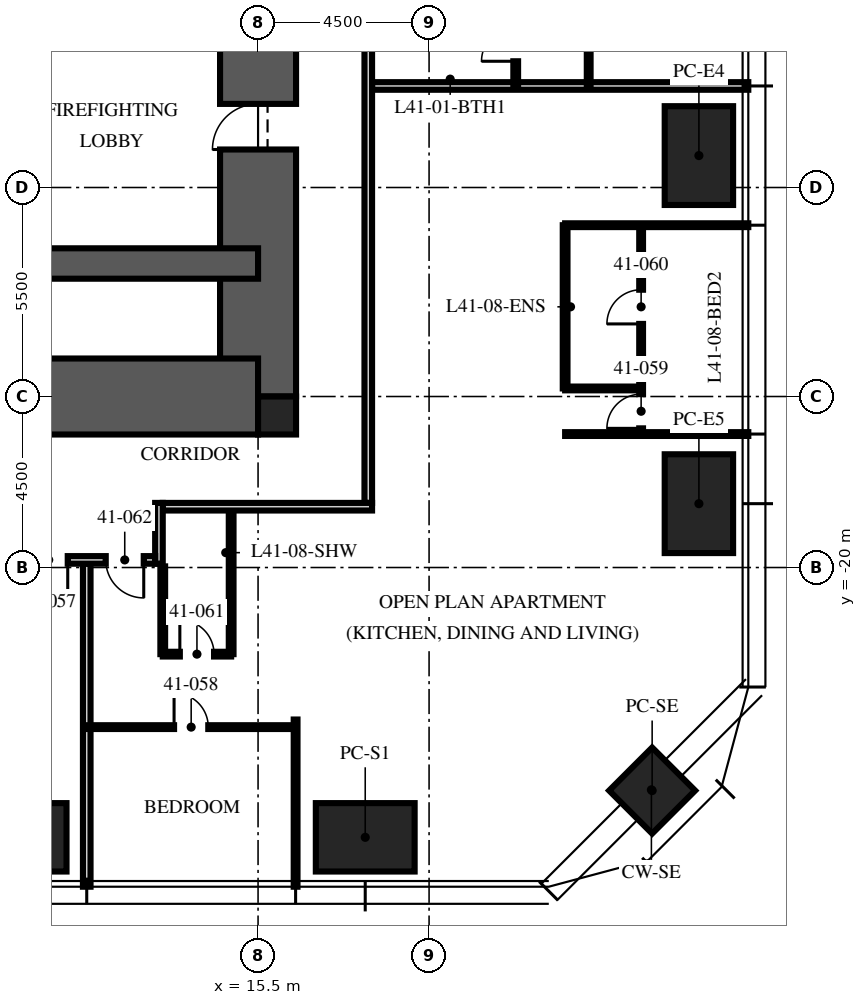
"""IFC4 building model, lengths in metres.
Left out: names, types, materials, properties, quantities, classifications, styles, units other than length and angle.
Written with IfcOpenShell. Run it as: python <this file> out.ifc"""

import sys

from ifc_helpers import new_model, si_unit, direction, frame, frame_2d, origin, origin_2d, place, context, subcontext, project, spatial, rectangle, extrude, element, fill, save


model = new_model("IFC4")
c1 = context("Model", 3, precision=1e-05, world=origin(), true_north=direction((0.0, 1.0)))
c2 = subcontext(c1, "Body", "Model", "MODEL_VIEW")
j1 = project(units=[si_unit("LENGTHUNIT", "METRE"), si_unit("PLANEANGLEUNIT", "RADIAN")], contexts=[c1])
p1 = place(None, origin())
s1 = spatial("IfcSite", under=j1, at=p1, CompositionType="ELEMENT")
p2 = place(p1, origin())
s2 = spatial("IfcBuilding", under=s1, at=p2, CompositionType="ELEMENT")
p3 = place(p2, frame((0.0, 0.0, 163.5)))
s3 = spatial("IfcBuildingStorey", under=s2, at=p3, CompositionType="ELEMENT", Elevation=163.5)
p4 = place(p3, frame((15.5, -15.5, -0.25), z_axis=(0.0, 0.0, 1.0), x_axis=(0.0, 1.0, 0.0)))
e1 = element("IfcWall", 1, at=p4, inside=s3, PredefinedType="SHEAR", context=c2, shape_type="SweptSolid", body=[
    extrude(rectangle(XDim=31.0, YDim=2.0, at=frame_2d((15.5, 0.0))), origin(), (0.0, 0.0, 1.0), 3.75),
])
p5 = place(p4, frame((6.5, 0.0, 0.25)))
e2 = element("IfcOpeningElement", 2, at=p5, cuts=e1, PredefinedType="OPENING", context=c2, shape_type="SweptSolid", body=[
    extrude(rectangle(XDim=1.2, YDim=2.1, at=frame_2d((0.6, 1.05))), frame((0.0, 1.01, 0.0), z_axis=(0.0, -1.0, 0.0), x_axis=(1.0, 0.0, 0.0)), (0.0, 0.0, 1.0), 2.02),
])
p6 = place(p4, frame((23.0, 0.0, 0.25)))
e3 = element("IfcOpeningElement", 3, at=p6, cuts=e1, PredefinedType="OPENING", context=c2, shape_type="SweptSolid", body=[
    extrude(rectangle(XDim=1.8, YDim=2.1, at=frame_2d((0.9, 1.05))), frame((0.0, 1.01, 0.0), z_axis=(0.0, -1.0, 0.0), x_axis=(1.0, 0.0, 0.0)), (0.0, 0.0, 1.0), 2.02),
])
p7 = place(p3, frame((-15.5, -15.5, -0.25), z_axis=(0.0, 0.0, 1.0), x_axis=(1.0, 0.0, 0.0)))
e4 = element("IfcWall", 4, at=p7, inside=s3, PredefinedType="SHEAR", context=c2, shape_type="SweptSolid", body=[
    extrude(rectangle(XDim=31.0, YDim=2.0, at=frame_2d((15.5, 0.0))), origin(), (0.0, 0.0, 1.0), 3.75),
])
p8 = place(p7, frame((10.4, 0.0, 0.25)))
e5 = element("IfcOpeningElement", 5, at=p8, cuts=e4, PredefinedType="OPENING", context=c2, shape_type="SweptSolid", body=[
    extrude(rectangle(XDim=1.1, YDim=2.1, at=frame_2d((0.55, 1.05))), frame((0.0, 1.01, 0.0), z_axis=(0.0, -1.0, 0.0), x_axis=(1.0, 0.0, 0.0)), (0.0, 0.0, 1.0), 2.02),
])
p9 = place(p7, frame((13.5, 0.0, 0.25)))
e6 = element("IfcOpeningElement", 6, at=p9, cuts=e4, PredefinedType="OPENING", context=c2, shape_type="SweptSolid", body=[
    extrude(rectangle(XDim=1.1, YDim=2.1, at=frame_2d((0.55, 1.05))), frame((0.0, 1.01, 0.0), z_axis=(0.0, -1.0, 0.0), x_axis=(1.0, 0.0, 0.0)), (0.0, 0.0, 1.0), 2.02),
])
p10 = place(p7, frame((16.6, 0.0, 0.25)))
e7 = element("IfcOpeningElement", 7, at=p10, cuts=e4, PredefinedType="OPENING", context=c2, shape_type="SweptSolid", body=[
    extrude(rectangle(XDim=1.1, YDim=2.1, at=frame_2d((0.55, 1.05))), frame((0.0, 1.01, 0.0), z_axis=(0.0, -1.0, 0.0), x_axis=(1.0, 0.0, 0.0)), (0.0, 0.0, 1.0), 2.02),
])
p11 = place(p3, frame((-15.5, -12.0, -0.25), z_axis=(0.0, 0.0, 1.0), x_axis=(1.0, 0.0, 0.0)))
e8 = element("IfcWall", 8, at=p11, inside=s3, PredefinedType="SHEAR", context=c2, shape_type="SweptSolid", body=[
    extrude(rectangle(XDim=31.0, YDim=0.8, at=frame_2d((15.5, 0.0))), origin(), (0.0, 0.0, 1.0), 3.75),
])
p12 = place(p3, frame((16.0, -16.0, -0.25), z_axis=(0.0, 0.0, 1.0), x_axis=(1.0, 0.0, 0.0)))
e9 = element("IfcColumn", 9, at=p12, inside=s3, PredefinedType="COLUMN", context=c2, shape_type="SweptSolid", body=[
    extrude(rectangle(XDim=1.0, YDim=1.0, at=origin_2d()), origin(), (0.0, 0.0, 1.0), 3.75),
])
for number, where, z_axis, x_axis in (
    (10, (27.1, -9.16, 0.0), (0.0, 0.0, 1.0), (0.0, 1.0, 0.0)),
    (11, (27.1, -18.32, 0.0), (0.0, 0.0, 1.0), (0.0, 1.0, 0.0)),
    (12, (18.32, -27.1, 0.0), (0.0, 0.0, 1.0), (1.0, 0.0, 0.0)),
    (13, (9.16, -27.1, 0.0), (0.0, 0.0, 1.0), (1.0, 0.0, 0.0)),
):
    element("IfcColumn", number, at=place(p3, frame(where, z_axis=z_axis, x_axis=x_axis)), inside=s3, PredefinedType="COLUMN", context=c2, shape_type="SweptSolid", body=[
        extrude(rectangle(XDim=2.6, YDim=1.8, at=origin_2d()), origin(), (0.0, 0.0, 1.0), 3.75),
    ])
p13 = place(p3, frame((25.87, -25.87, 0.0), z_axis=(0.0, 0.0, 1.0), x_axis=(0.707106781187, 0.707106781187, 0.0)))
e14 = element("IfcColumn", 14, at=p13, inside=s3, PredefinedType="COLUMN", context=c2, shape_type="SweptSolid", body=[
    extrude(rectangle(XDim=1.6, YDim=1.6, at=origin_2d()), origin(), (0.0, 0.0, 1.0), 3.75),
])
p14 = place(p3, frame((18.5, -7.328, 0.0), z_axis=(0.0, 0.0, 1.0), x_axis=(1.0, 0.0, 0.0)))
e15 = element("IfcWall", 15, at=p14, inside=s3, PredefinedType="PARTITIONING", context=c2, shape_type="SweptSolid", body=[
    extrude(rectangle(XDim=9.9, YDim=0.2, at=frame_2d((4.95, 0.0))), origin(), (0.0, 0.0, 1.0), 2.81),
])
p15 = place(p3, frame((10.992, -19.9, 0.0), z_axis=(0.0, 0.0, 1.0), x_axis=(0.0, -1.0, 0.0)))
e16 = element("IfcWall", 16, at=p15, inside=s3, PredefinedType="PARTITIONING", context=c2, shape_type="SweptSolid", body=[
    extrude(rectangle(XDim=8.5, YDim=0.2, at=frame_2d((4.25, 0.0))), origin(), (0.0, 0.0, 1.0), 2.81),
])
p16 = place(p3, frame((16.488, -24.0, 0.0), z_axis=(0.0, 0.0, 1.0), x_axis=(0.0, -1.0, 0.0)))
e17 = element("IfcWall", 17, at=p16, inside=s3, PredefinedType="PARTITIONING", context=c2, shape_type="SweptSolid", body=[
    extrude(rectangle(XDim=4.4, YDim=0.1, at=frame_2d((2.2, 0.0))), origin(), (0.0, 0.0, 1.0), 2.81),
])
for number, where, z_axis, x_axis in (
    (18, (23.58, -16.488, 0.0), (0.0, 0.0, 1.0), (1.0, 0.0, 0.0)),
    (19, (23.58, -10.992, 0.0), (0.0, 0.0, 1.0), (1.0, 0.0, 0.0)),
):
    element("IfcWall", number, at=place(p3, frame(where, z_axis=z_axis, x_axis=x_axis)), inside=s3, PredefinedType="PARTITIONING", context=c2, shape_type="SweptSolid", body=[
        extrude(rectangle(XDim=4.82, YDim=0.1, at=frame_2d((2.41, 0.0))), origin(), (0.0, 0.0, 1.0), 2.81),
    ])
p17 = place(p3, frame((24.2, -7.328, 0.0), z_axis=(0.0, 0.0, 1.0), x_axis=(0.0, 1.0, 0.0)))
e20 = element("IfcWall", 20, at=p17, inside=s3, PredefinedType="PARTITIONING", context=c2, shape_type="SweptSolid", body=[
    extrude(rectangle(XDim=5.496, YDim=0.1, at=frame_2d((2.748, 0.0))), origin(), (0.0, 0.0, 1.0), 2.81),
])
p18 = place(p17, frame((2.298, 0.0, 0.0)))
e21 = element("IfcOpeningElement", 21, at=p18, cuts=e20, PredefinedType="OPENING", context=c2, shape_type="SweptSolid", body=[
    extrude(rectangle(XDim=0.9, YDim=2.1, at=frame_2d((0.45, 1.05))), frame((0.0, 0.06, 0.0), z_axis=(0.0, -1.0, 0.0), x_axis=(1.0, 0.0, 0.0)), (0.0, 0.0, 1.0), 0.12),
])
p19 = place(p3, frame((22.28, -7.328, 0.0), z_axis=(0.0, 0.0, 1.0), x_axis=(0.0, 1.0, 0.0)))
e22 = element("IfcWall", 22, at=p19, inside=s3, PredefinedType="PARTITIONING", context=c2, shape_type="SweptSolid", body=[
    extrude(rectangle(XDim=2.2, YDim=0.125, at=frame_2d((1.1, 0.0))), origin(), (0.0, 0.0, 1.0), 3.5),
])
p20 = place(p19, frame((0.65, 0.0, 0.0)))
e23 = element("IfcOpeningElement", 23, at=p20, cuts=e22, PredefinedType="OPENING", context=c2, shape_type="SweptSolid", body=[
    extrude(rectangle(XDim=0.9, YDim=2.1, at=frame_2d((0.45, 1.05))), frame((0.0, 0.073, 0.0), z_axis=(0.0, -1.0, 0.0), x_axis=(1.0, 0.0, 0.0)), (0.0, 0.0, 1.0), 0.145),
])
p21 = place(p3, frame((10.992, -24.2, 0.0), z_axis=(0.0, 0.0, 1.0), x_axis=(1.0, 0.0, 0.0)))
e24 = element("IfcWall", 24, at=p21, inside=s3, PredefinedType="PARTITIONING", context=c2, shape_type="SweptSolid", body=[
    extrude(rectangle(XDim=5.496, YDim=0.1, at=frame_2d((2.748, 0.0))), origin(), (0.0, 0.0, 1.0), 2.81),
])
p22 = place(p21, frame((2.298, 0.0, 0.0)))
e25 = element("IfcOpeningElement", 25, at=p22, cuts=e24, PredefinedType="OPENING", context=c2, shape_type="SweptSolid", body=[
    extrude(rectangle(XDim=0.9, YDim=2.1, at=frame_2d((0.45, 1.05))), frame((0.0, 0.06, 0.0), z_axis=(0.0, -1.0, 0.0), x_axis=(1.0, 0.0, 0.0)), (0.0, 0.0, 1.0), 0.12),
])
p23 = place(p3, frame((25.58, -16.488, 0.0), z_axis=(0.0, 0.0, 1.0), x_axis=(0.0, 1.0, 0.0)))
e26 = element("IfcWall", 26, at=p23, inside=s3, PredefinedType="PARTITIONING", context=c2, shape_type="SweptSolid", body=[
    extrude(rectangle(XDim=5.496, YDim=0.1, at=frame_2d((2.748, 0.0))), origin(), (0.0, 0.0, 1.0), 2.81),
])
p24 = place(p23, frame((0.15, 0.0, 0.0)))
e27 = element("IfcOpeningElement", 27, at=p24, cuts=e26, PredefinedType="OPENING", context=c2, shape_type="SweptSolid", body=[
    extrude(rectangle(XDim=0.9, YDim=2.1, at=frame_2d((0.45, 1.05))), frame((0.0, 0.06, 0.0), z_axis=(0.0, -1.0, 0.0), x_axis=(1.0, 0.0, 0.0)), (0.0, 0.0, 1.0), 0.12),
])
p25 = place(p23, frame((2.898, 0.0, 0.0)))
e28 = element("IfcOpeningElement", 28, at=p25, cuts=e26, PredefinedType="OPENING", context=c2, shape_type="SweptSolid", body=[
    extrude(rectangle(XDim=0.9, YDim=2.1, at=frame_2d((0.45, 1.05))), frame((0.0, 0.06, 0.0), z_axis=(0.0, -1.0, 0.0), x_axis=(1.0, 0.0, 0.0)), (0.0, 0.0, 1.0), 0.12),
])
p26 = place(p3, frame((23.58, -15.288, 0.0), z_axis=(0.0, 0.0, 1.0), x_axis=(1.0, 0.0, 0.0)))
e29 = element("IfcWall", 29, at=p26, inside=s3, PredefinedType="PARTITIONING", context=c2, shape_type="SweptSolid", body=[
    extrude(rectangle(XDim=2.0, YDim=0.1, at=frame_2d((1.0, 0.0))), origin(), (0.0, 0.0, 1.0), 3.5),
])
p27 = place(p3, frame((23.58, -15.288, 0.0), z_axis=(0.0, 0.0, 1.0), x_axis=(0.0, 1.0, 0.0)))
e30 = element("IfcWall", 30, at=p27, inside=s3, PredefinedType="PARTITIONING", context=c2, shape_type="SweptSolid", body=[
    extrude(rectangle(XDim=4.296, YDim=0.125, at=frame_2d((2.148, 0.0))), origin(), (0.0, 0.0, 1.0), 2.81),
])
p28 = place(p3, frame((12.992, -22.28, 0.0), z_axis=(0.0, 0.0, 1.0), x_axis=(1.0, 0.0, 0.0)))
e31 = element("IfcWall", 31, at=p28, inside=s3, PredefinedType="PARTITIONING", context=c2, shape_type="SweptSolid", body=[
    extrude(rectangle(XDim=1.8, YDim=0.125, at=frame_2d((0.9, 0.0))), origin(), (0.0, 0.0, 1.0), 2.81),
])
p29 = place(p28, frame((0.45, 0.0, 0.0)))
e32 = element("IfcOpeningElement", 32, at=p29, cuts=e31, PredefinedType="OPENING", context=c2, shape_type="SweptSolid", body=[
    extrude(rectangle(XDim=0.9, YDim=2.1, at=frame_2d((0.45, 1.05))), frame((0.0, 0.073, 0.0), z_axis=(0.0, -1.0, 0.0), x_axis=(1.0, 0.0, 0.0)), (0.0, 0.0, 1.0), 0.145),
])
p30 = place(p3, frame((12.992, -19.97, 0.0), z_axis=(0.0, 0.0, 1.0), x_axis=(0.0, -1.0, 0.0)))
e33 = element("IfcWall", 33, at=p30, inside=s3, PredefinedType="PARTITIONING", context=c2, shape_type="SweptSolid", body=[
    extrude(rectangle(XDim=2.31, YDim=0.125, at=frame_2d((1.155, 0.0))), origin(), (0.0, 0.0, 1.0), 3.5),
])
p31 = place(p3, frame((14.792, -18.5, 0.0), z_axis=(0.0, 0.0, 1.0), x_axis=(0.0, -1.0, 0.0)))
e34 = element("IfcWall", 34, at=p31, inside=s3, PredefinedType="PARTITIONING", context=c2, shape_type="SweptSolid", body=[
    extrude(rectangle(XDim=3.78, YDim=0.125, at=frame_2d((1.89, 0.0))), origin(), (0.0, 0.0, 1.0), 3.5),
])
p32 = place(p3, frame((18.4, -18.3, 0.0), z_axis=(0.0, 0.0, 1.0), x_axis=(0.0, 1.0, 0.0)))
e35 = element("IfcWall", 35, at=p32, inside=s3, PredefinedType="PARTITIONING", context=c2, shape_type="SweptSolid", body=[
    extrude(rectangle(XDim=35.0, YDim=0.2, at=frame_2d((17.5, 0.0))), origin(), (0.0, 0.0, 1.0), 2.3),
])
p33 = place(p32, frame((18.492, 0.0, 0.0)))
e36 = element("IfcOpeningElement", 36, at=p33, cuts=e35, PredefinedType="OPENING", context=c2, shape_type="SweptSolid", body=[
    extrude(rectangle(XDim=1.0, YDim=2.2, at=frame_2d((0.5, 1.1))), frame((0.0, 0.11, 0.0), z_axis=(0.0, -1.0, 0.0), x_axis=(1.0, 0.0, 0.0)), (0.0, 0.0, 1.0), 0.22),
])
p34 = place(p32, frame((32.652, 0.0, 0.0)))
e37 = element("IfcOpeningElement", 37, at=p34, cuts=e35, PredefinedType="OPENING", context=c2, shape_type="SweptSolid", body=[
    extrude(rectangle(XDim=1.0, YDim=2.2, at=frame_2d((0.5, 1.1))), frame((0.0, 0.11, 0.0), z_axis=(0.0, -1.0, 0.0), x_axis=(1.0, 0.0, 0.0)), (0.0, 0.0, 1.0), 0.22),
])
p35 = place(p3, frame((18.5, -18.4, 0.0), z_axis=(0.0, 0.0, 1.0), x_axis=(-1.0, 0.0, 0.0)))
e38 = element("IfcWall", 38, at=p35, inside=s3, PredefinedType="PARTITIONING", context=c2, shape_type="SweptSolid", body=[
    extrude(rectangle(XDim=5.508, YDim=0.2, at=frame_2d((2.754, 0.0))), origin(), (0.0, 0.0, 1.0), 2.3),
])
p36 = place(p3, frame((12.892, -18.3, 0.0), z_axis=(0.0, 0.0, 1.0), x_axis=(0.0, -1.0, 0.0)))
e39 = element("IfcWall", 39, at=p36, inside=s3, PredefinedType="PARTITIONING", context=c2, shape_type="SweptSolid", body=[
    extrude(rectangle(XDim=1.6, YDim=0.2, at=frame_2d((0.8, 0.0))), origin(), (0.0, 0.0, 1.0), 3.5),
])
p37 = place(p3, frame((12.792, -19.8, 0.0), z_axis=(0.0, 0.0, 1.0), x_axis=(-1.0, 0.0, 0.0)))
e40 = element("IfcWall", 40, at=p37, inside=s3, PredefinedType="PARTITIONING", context=c2, shape_type="SweptSolid", body=[
    extrude(rectangle(XDim=3.6, YDim=0.2, at=frame_2d((1.8, 0.0))), origin(), (0.0, 0.0, 1.0), 2.7),
])
p38 = place(p37, frame((2.3, 0.0, 0.0)))
e41 = element("IfcOpeningElement", 41, at=p38, cuts=e40, PredefinedType="OPENING", context=c2, shape_type="SweptSolid", body=[
    extrude(rectangle(XDim=1.0, YDim=2.2, at=frame_2d((0.5, 1.1))), frame((0.0, 0.11, 0.0), z_axis=(0.0, -1.0, 0.0), x_axis=(1.0, 0.0, 0.0)), (0.0, 0.0, 1.0), 0.22),
])
p39 = place(p37, frame((0.3, 0.0, 0.0)))
e42 = element("IfcOpeningElement", 42, at=p39, cuts=e40, PredefinedType="OPENING", context=c2, shape_type="SweptSolid", body=[
    extrude(rectangle(XDim=1.0, YDim=2.2, at=frame_2d((0.5, 1.1))), frame((0.0, 0.11, 0.0), z_axis=(0.0, -1.0, 0.0), x_axis=(1.0, 0.0, 0.0)), (0.0, 0.0, 1.0), 0.22),
])
p40 = place(p5, origin())
e43 = element("IfcDoor", 43, at=p40, inside=s3, OperationType="SINGLE_SWING_LEFT", PredefinedType="DOOR", context=c2, shape_type="SweptSolid", body=[
    extrude(rectangle(XDim=1.2, YDim=2.1, at=frame_2d((0.6, 1.05))), frame((0.0, 0.025, 0.0), z_axis=(0.0, -1.0, 0.0), x_axis=(1.0, 0.0, 0.0)), (0.0, 0.0, 1.0), 0.05),
])
fill(e2, e43)
p41 = place(p20, origin())
e44 = element("IfcDoor", 44, at=p41, inside=s3, OperationType="SINGLE_SWING_LEFT", PredefinedType="DOOR", context=c2, shape_type="SweptSolid", body=[
    extrude(rectangle(XDim=0.9, YDim=2.1, at=frame_2d((0.45, 1.05))), frame((0.0, 0.025, 0.0), z_axis=(0.0, -1.0, 0.0), x_axis=(1.0, 0.0, 0.0)), (0.0, 0.0, 1.0), 0.05),
])
fill(e23, e44)
p42 = place(p38, origin())
e45 = element("IfcDoor", 45, at=p42, inside=s3, OperationType="SINGLE_SWING_LEFT", PredefinedType="DOOR", context=c2, shape_type="SweptSolid", body=[
    extrude(rectangle(XDim=1.0, YDim=2.2, at=frame_2d((0.5, 1.1))), frame((0.0, 0.025, 0.0), z_axis=(0.0, -1.0, 0.0), x_axis=(1.0, 0.0, 0.0)), (0.0, 0.0, 1.0), 0.05),
])
fill(e41, e45)
p43 = place(p22, origin())
e46 = element("IfcDoor", 46, at=p43, inside=s3, OperationType="SINGLE_SWING_LEFT", PredefinedType="DOOR", context=c2, shape_type="SweptSolid", body=[
    extrude(rectangle(XDim=0.9, YDim=2.1, at=frame_2d((0.45, 1.05))), frame((0.0, 0.025, 0.0), z_axis=(0.0, -1.0, 0.0), x_axis=(1.0, 0.0, 0.0)), (0.0, 0.0, 1.0), 0.05),
])
fill(e25, e46)
p44 = place(p24, origin())
e47 = element("IfcDoor", 47, at=p44, inside=s3, OperationType="SINGLE_SWING_LEFT", PredefinedType="DOOR", context=c2, shape_type="SweptSolid", body=[
    extrude(rectangle(XDim=0.9, YDim=2.1, at=frame_2d((0.45, 1.05))), frame((0.0, 0.025, 0.0), z_axis=(0.0, -1.0, 0.0), x_axis=(1.0, 0.0, 0.0)), (0.0, 0.0, 1.0), 0.05),
])
fill(e27, e47)
p45 = place(p25, origin())
e48 = element("IfcDoor", 48, at=p45, inside=s3, OperationType="SINGLE_SWING_LEFT", PredefinedType="DOOR", context=c2, shape_type="SweptSolid", body=[
    extrude(rectangle(XDim=0.9, YDim=2.1, at=frame_2d((0.45, 1.05))), frame((0.0, 0.025, 0.0), z_axis=(0.0, -1.0, 0.0), x_axis=(1.0, 0.0, 0.0)), (0.0, 0.0, 1.0), 0.05),
])
fill(e28, e48)
p46 = place(p29, origin())
e49 = element("IfcDoor", 49, at=p46, inside=s3, OperationType="SINGLE_SWING_LEFT", PredefinedType="DOOR", context=c2, shape_type="SweptSolid", body=[
    extrude(rectangle(XDim=0.9, YDim=2.1, at=frame_2d((0.45, 1.05))), frame((0.0, 0.025, 0.0), z_axis=(0.0, -1.0, 0.0), x_axis=(1.0, 0.0, 0.0)), (0.0, 0.0, 1.0), 0.05),
])
fill(e32, e49)
p47 = place(p39, origin())
e50 = element("IfcDoor", 50, at=p47, inside=s3, OperationType="SINGLE_SWING_LEFT", PredefinedType="DOOR", context=c2, shape_type="SweptSolid", body=[
    extrude(rectangle(XDim=1.0, YDim=2.2, at=frame_2d((0.5, 1.1))), frame((0.0, 0.025, 0.0), z_axis=(0.0, -1.0, 0.0), x_axis=(1.0, 0.0, 0.0)), (0.0, 0.0, 1.0), 0.05),
])
fill(e42, e50)
save(model, sys.argv[1])
